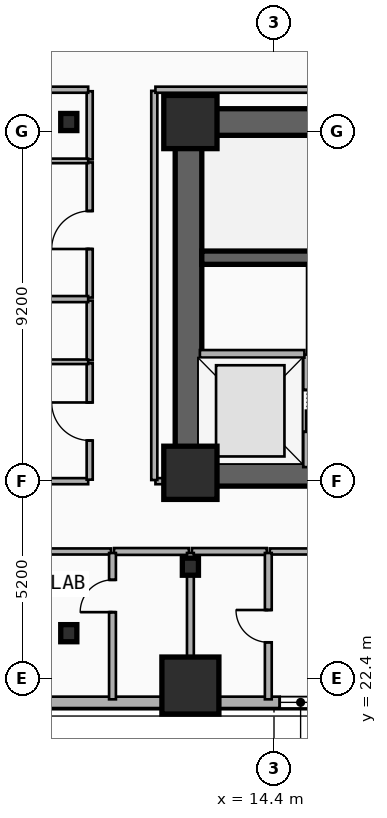
"""IFC4 building model, lengths in metres.
Left out: names, types, materials, properties, quantities, classifications, styles, units other than length and angle.
Written with IfcOpenShell. Run it as: python <this file> out.ifc"""

import sys

from ifc_helpers import new_model, si_unit, direction, frame, frame_2d, origin, origin_2d, place, context, subcontext, project, spatial, rectangle, i_section, extrude, element, fill, save


model = new_model("IFC4")
c1 = context("Model", 3, precision=1e-05, world=origin(), true_north=direction((0.0, 1.0)))
c2 = subcontext(c1, "Body", "Model", "MODEL_VIEW")
j1 = project(units=[si_unit("LENGTHUNIT", "METRE"), si_unit("PLANEANGLEUNIT", "RADIAN")], contexts=[c1])
p1 = place(None, origin())
s1 = spatial("IfcSite", under=j1, at=p1, CompositionType="ELEMENT")
p2 = place(p1, origin())
s2 = spatial("IfcBuilding", under=s1, at=p2, CompositionType="ELEMENT")
p3 = place(p2, frame((0.0, 0.0, 43.0)))
s3 = spatial("IfcBuildingStorey", under=s2, at=p3, CompositionType="ELEMENT", Elevation=43.0)
p4 = place(p3, frame((12.15, 37.05, 0.0), z_axis=(0.0, 0.0, 1.0), x_axis=(1.0, 0.0, 0.0)))
e1 = element("IfcWall", 1, at=p4, inside=s3, PredefinedType="SHEAR", context=c2, shape_type="SweptSolid", body=[
    extrude(rectangle(XDim=33.23, YDim=0.7, at=frame_2d((16.615, 0.0))), origin(), (0.0, 0.0, 1.0), 3.5),
])
p5 = place(p3, frame((21.18, 27.82, 0.0), z_axis=(0.0, 0.0, 1.0), x_axis=(-1.0, 0.0, 0.0)))
e2 = element("IfcWall", 2, at=p5, inside=s3, PredefinedType="SHEAR", context=c2, shape_type="SweptSolid", body=[
    extrude(rectangle(XDim=9.03, YDim=0.7, at=frame_2d((4.515, 0.0))), origin(), (0.0, 0.0, 1.0), 3.5),
])
p6 = place(p5, frame((2.68, 0.0, 0.0)))
e3 = element("IfcOpeningElement", 3, at=p6, cuts=e2, PredefinedType="OPENING", context=c2, shape_type="SweptSolid", body=[
    extrude(rectangle(XDim=1.1, YDim=2.15, at=frame_2d((0.55, 1.075))), frame((0.0, 0.36, 0.0), z_axis=(0.0, -1.0, 0.0), x_axis=(1.0, 0.0, 0.0)), (0.0, 0.0, 1.0), 0.72),
])
p7 = place(p3, frame((12.15, 28.17, 0.0), z_axis=(0.0, 0.0, 1.0), x_axis=(0.0, 1.0, 0.0)))
e4 = element("IfcWall", 4, at=p7, inside=s3, PredefinedType="SHEAR", context=c2, shape_type="SweptSolid", body=[
    extrude(rectangle(XDim=8.53, YDim=0.7, at=frame_2d((4.265, 0.0))), origin(), (0.0, 0.0, 1.0), 3.5),
])
p8 = place(p3, frame((21.005, 33.48, 0.0), z_axis=(0.0, 0.0, 1.0), x_axis=(-1.0, 0.0, 0.0)))
e5 = element("IfcWall", 5, at=p8, inside=s3, PredefinedType="SHEAR", context=c2, shape_type="SweptSolid", body=[
    extrude(rectangle(XDim=8.505, YDim=0.35, at=frame_2d((4.252, 0.0))), origin(), (0.0, 0.0, 1.0), 3.5),
])
p9 = place(p8, frame((0.22, 0.0, 0.0)))
e6 = element("IfcOpeningElement", 6, at=p9, cuts=e5, PredefinedType="OPENING", context=c2, shape_type="SweptSolid", body=[
    extrude(rectangle(XDim=1.1, YDim=2.15, at=frame_2d((0.55, 1.075))), frame((0.0, 0.185, 0.0), z_axis=(0.0, -1.0, 0.0), x_axis=(1.0, 0.0, 0.0)), (0.0, 0.0, 1.0), 0.37),
])
for number, where, z_axis, x_axis in (
    (7, (12.2, 27.82, 0.0), (0.0, 0.0, 1.0), (1.0, 0.0, 0.0)),
    (8, (12.2, 37.05, 0.0), (0.0, 0.0, 1.0), (1.0, 0.0, 0.0)),
):
    element("IfcColumn", number, at=place(p3, frame(where, z_axis=z_axis, x_axis=x_axis)), inside=s3, PredefinedType="COLUMN", context=c2, shape_type="SweptSolid", body=[
        extrude(rectangle(XDim=1.4, YDim=1.4, at=origin_2d()), origin(), (0.0, 0.0, 1.0), 3.5),
    ])
p10 = place(p3, frame((12.2, 25.35, 0.0), z_axis=(0.0, 0.0, 1.0), x_axis=(1.0, 0.0, 0.0)))
e9 = element("IfcColumn", 9, at=p10, inside=s3, PredefinedType="COLUMN", context=c2, shape_type="SweptSolid", body=[
    extrude(i_section(OverallWidth=0.424, OverallDepth=0.45, WebThickness=0.041, FlangeThickness=0.065, FilletRadius=0.015, at=origin_2d()), origin(), (0.0, 0.0, 1.0), 3.5),
])
p11 = place(p3, frame((12.2, 22.331, 0.0), z_axis=(0.0, -0.090241349316, 0.995919925935), x_axis=(1.0, 0.0, 0.0)))
e10 = element("IfcColumn", 10, at=p11, inside=s3, PredefinedType="COLUMN", context=c2, shape_type="SweptSolid", body=[
    extrude(rectangle(XDim=1.5, YDim=1.5, at=origin_2d()), origin(), (0.0, 0.0, 1.0), 3.514),
])
for number, where, z_axis, x_axis in (
    (11, (9.0, 23.6, 0.0), (0.0, 0.0, 1.0), (1.0, 0.0, 0.0)),
    (12, (9.0, 37.05, 0.0), (0.0, 0.0, 1.0), (1.0, 0.0, 0.0)),
):
    element("IfcColumn", number, at=place(p3, frame(where, z_axis=z_axis, x_axis=x_axis)), inside=s3, PredefinedType="COLUMN", context=c2, shape_type="SweptSolid", body=[
        extrude(i_section(OverallWidth=0.424, OverallDepth=0.45, WebThickness=0.041, FlangeThickness=0.065, FilletRadius=0.015, at=origin_2d()), origin(), (0.0, 0.0, 1.0), 3.5),
    ])
p12 = place(p3, frame((53.4, 21.78, 0.0), z_axis=(0.0, 0.0, 1.0), x_axis=(-1.0, 0.0, 0.0)))
e13 = element("IfcWall", 13, at=p12, inside=s3, PredefinedType="SOLIDWALL", context=c2, shape_type="SweptSolid", body=[
    extrude(rectangle(XDim=49.2, YDim=0.3, at=frame_2d((24.6, 0.0))), origin(), (0.0, 0.0, 1.0), 2.82),
])
p13 = place(p12, frame((46.859, 0.0, 0.65)))
e14 = element("IfcOpeningElement", 14, at=p13, cuts=e13, PredefinedType="OPENING", context=c2, shape_type="SweptSolid", body=[
    extrude(rectangle(XDim=1.8, YDim=1.8, at=frame_2d((0.9, 0.9))), frame((0.0, 0.16, 0.0), z_axis=(0.0, -1.0, 0.0), x_axis=(1.0, 0.0, 0.0)), (0.0, 0.0, 1.0), 0.32),
])
p14 = place(p12, frame((37.75, 0.0, 0.52)))
e15 = element("IfcOpeningElement", 15, at=p14, cuts=e13, PredefinedType="OPENING", context=c2, shape_type="SweptSolid", body=[
    extrude(rectangle(XDim=1.1, YDim=1.05, at=frame_2d((0.55, 0.525))), frame((0.0, 0.16, 0.0), z_axis=(0.0, -1.0, 0.0), x_axis=(1.0, 0.0, 0.0)), (0.0, 0.0, 1.0), 0.32),
])
p15 = place(p12, frame((14.658, 0.0, 0.34)))
e16 = element("IfcOpeningElement", 16, at=p15, cuts=e13, PredefinedType="OPENING", context=c2, shape_type="SweptSolid", body=[
    extrude(rectangle(XDim=1.2, YDim=1.5, at=frame_2d((0.6, 0.75))), frame((0.0, 0.16, 0.0), z_axis=(0.0, -1.0, 0.0), x_axis=(1.0, 0.0, 0.0)), (0.0, 0.0, 1.0), 0.32),
])
p16 = place(p12, frame((4.223, 0.0, 0.65)))
e17 = element("IfcOpeningElement", 17, at=p16, cuts=e13, PredefinedType="OPENING", context=c2, shape_type="SweptSolid", body=[
    extrude(rectangle(XDim=1.8, YDim=1.8, at=frame_2d((0.9, 0.9))), frame((0.0, 0.16, 0.0), z_axis=(0.0, -1.0, 0.0), x_axis=(1.0, 0.0, 0.0)), (0.0, 0.0, 1.0), 0.32),
])
p17 = place(p3, frame((15.27, 27.97, 0.0), z_axis=(0.0, 0.0, 1.0), x_axis=(0.0, 1.0, 0.0)))
e18 = element("IfcWall", 18, at=p17, inside=s3, PredefinedType="PARTITIONING", context=c2, shape_type="SweptSolid", body=[
    extrude(rectangle(XDim=2.96, YDim=0.2, at=frame_2d((1.48, 0.0))), origin(), (0.0, 0.0, 1.0), 2.212),
])
p18 = place(p17, frame((0.93, 0.0, 0.0)))
e19 = element("IfcOpeningElement", 19, at=p18, cuts=e18, PredefinedType="OPENING", context=c2, shape_type="SweptSolid", body=[
    extrude(rectangle(XDim=1.1, YDim=2.15, at=frame_2d((0.55, 1.075))), frame((0.0, 0.11, 0.0), z_axis=(0.0, -1.0, 0.0), x_axis=(1.0, 0.0, 0.0)), (0.0, 0.0, 1.0), 0.22),
])
p19 = place(p3, frame((12.45, 30.95, 0.0), z_axis=(0.0, 0.0, 1.0), x_axis=(1.0, 0.0, 0.0)))
e20 = element("IfcWall", 20, at=p19, inside=s3, PredefinedType="PARTITIONING", context=c2, shape_type="SweptSolid", body=[
    extrude(rectangle(XDim=2.75, YDim=0.2, at=frame_2d((1.375, 0.0))), origin(), (0.0, 0.0, 1.0), 2.212),
])
p20 = place(p3, frame((0.26, 27.6, 0.0), z_axis=(0.0, 0.0, 1.0), x_axis=(1.0, 0.0, 0.0)))
e21 = element("IfcWall", 21, at=p20, inside=s3, PredefinedType="PARTITIONING", context=c2, shape_type="SweptSolid", body=[
    extrude(rectangle(XDim=9.25, YDim=0.16, at=frame_2d((4.625, 0.0))), origin(), (0.0, 0.0, 1.0), 2.57),
])
p21 = place(p20, frame((4.125, 0.0, 0.0)))
e22 = element("IfcOpeningElement", 22, at=p21, cuts=e21, PredefinedType="OPENING", context=c2, shape_type="SweptSolid", body=[
    extrude(rectangle(XDim=1.0, YDim=2.15, at=frame_2d((0.5, 1.075))), frame((0.0, 0.09, 0.0), z_axis=(0.0, -1.0, 0.0), x_axis=(1.0, 0.0, 0.0)), (0.0, 0.0, 1.0), 0.18),
])
p22 = place(p3, frame((0.26, 25.75, 0.0), z_axis=(0.0, 0.0, 1.0), x_axis=(1.0, 0.0, 0.0)))
e23 = element("IfcWall", 23, at=p22, inside=s3, PredefinedType="PARTITIONING", context=c2, shape_type="SweptSolid", body=[
    extrude(rectangle(XDim=9.85, YDim=0.16, at=frame_2d((4.925, 0.0))), origin(), (0.0, 0.0, 1.0), 2.57),
])
p23 = place(p22, frame((4.425, 0.0, 0.0)))
e24 = element("IfcOpeningElement", 24, at=p23, cuts=e23, PredefinedType="OPENING", context=c2, shape_type="SweptSolid", body=[
    extrude(rectangle(XDim=1.0, YDim=2.15, at=frame_2d((0.5, 1.075))), frame((0.0, 0.09, 0.0), z_axis=(0.0, -1.0, 0.0), x_axis=(1.0, 0.0, 0.0)), (0.0, 0.0, 1.0), 0.18),
])
p24 = place(p3, frame((10.19, 25.75, 0.0), z_axis=(0.0, 0.0, 1.0), x_axis=(1.0, 0.0, 0.0)))
e25 = element("IfcWall", 25, at=p24, inside=s3, PredefinedType="PLUMBINGWALL", context=c2, shape_type="SweptSolid", body=[
    extrude(rectangle(XDim=1.97, YDim=0.18, at=frame_2d((0.985, 0.0))), origin(), (0.0, 0.0, 1.0), 2.28),
])
p25 = place(p3, frame((14.29, 25.75, 0.0), z_axis=(0.0, 0.0, 1.0), x_axis=(1.0, 0.0, 0.0)))
e26 = element("IfcWall", 26, at=p25, inside=s3, PredefinedType="PARTITIONING", context=c2, shape_type="SweptSolid", body=[
    extrude(rectangle(XDim=8.47, YDim=0.16, at=frame_2d((4.235, 0.0))), origin(), (0.0, 0.0, 1.0), 2.28),
])
p26 = place(p25, frame((3.735, 0.0, 0.0)))
e27 = element("IfcOpeningElement", 27, at=p26, cuts=e26, PredefinedType="OPENING", context=c2, shape_type="SweptSolid", body=[
    extrude(rectangle(XDim=1.0, YDim=2.15, at=frame_2d((0.5, 1.075))), frame((0.0, 0.09, 0.0), z_axis=(0.0, -1.0, 0.0), x_axis=(1.0, 0.0, 0.0)), (0.0, 0.0, 1.0), 0.18),
])
p27 = place(p3, frame((12.24, 25.75, 0.0), z_axis=(0.0, 0.0, 1.0), x_axis=(1.0, 0.0, 0.0)))
e28 = element("IfcWall", 28, at=p27, inside=s3, PredefinedType="PLUMBINGWALL", context=c2, shape_type="SweptSolid", body=[
    extrude(rectangle(XDim=1.97, YDim=0.18, at=frame_2d((0.985, 0.0))), origin(), (0.0, 0.0, 1.0), 2.28),
])
p28 = place(p3, frame((9.55, 27.64, 0.0), z_axis=(0.0, 0.0, 1.0), x_axis=(0.0, 1.0, 0.0)))
e29 = element("IfcWall", 29, at=p28, inside=s3, PredefinedType="PARTITIONING", context=c2, shape_type="SweptSolid", body=[
    extrude(rectangle(XDim=3.061, YDim=0.16, at=frame_2d((1.531, 0.0))), origin(), (0.0, 0.0, 1.0), 3.24),
])
p29 = place(p28, frame((1.031, 0.0, 0.0)))
e30 = element("IfcOpeningElement", 30, at=p29, cuts=e29, PredefinedType="OPENING", context=c2, shape_type="SweptSolid", body=[
    extrude(rectangle(XDim=1.0, YDim=2.15, at=frame_2d((0.5, 1.075))), frame((0.0, 0.09, 0.0), z_axis=(0.0, -1.0, 0.0), x_axis=(1.0, 0.0, 0.0)), (0.0, 0.0, 1.0), 0.18),
])
p30 = place(p3, frame((9.55, 30.781, 0.0), z_axis=(0.0, 0.0, 1.0), x_axis=(0.0, 1.0, 0.0)))
e31 = element("IfcWall", 31, at=p30, inside=s3, PredefinedType="PARTITIONING", context=c2, shape_type="SweptSolid", body=[
    extrude(rectangle(XDim=1.57, YDim=0.16, at=frame_2d((0.785, 0.0))), origin(), (0.0, 0.0, 1.0), 3.24),
])
p31 = place(p3, frame((9.55, 32.431, 0.0), z_axis=(0.0, 0.0, 1.0), x_axis=(0.0, 1.0, 0.0)))
e32 = element("IfcWall", 32, at=p31, inside=s3, PredefinedType="PARTITIONING", context=c2, shape_type="SweptSolid", body=[
    extrude(rectangle(XDim=3.556, YDim=0.16, at=frame_2d((1.778, 0.0))), origin(), (0.0, 0.0, 1.0), 3.24),
])
p32 = place(p31, frame((1.278, 0.0, 0.0)))
e33 = element("IfcOpeningElement", 33, at=p32, cuts=e32, PredefinedType="OPENING", context=c2, shape_type="SweptSolid", body=[
    extrude(rectangle(XDim=1.0, YDim=2.15, at=frame_2d((0.5, 1.075))), frame((0.0, 0.09, 0.0), z_axis=(0.0, -1.0, 0.0), x_axis=(1.0, 0.0, 0.0)), (0.0, 0.0, 1.0), 0.18),
])
p33 = place(p3, frame((9.55, 36.067, 0.0), z_axis=(0.0, 0.0, 1.0), x_axis=(0.0, 1.0, 0.0)))
e34 = element("IfcWall", 34, at=p33, inside=s3, PredefinedType="PARTITIONING", context=c2, shape_type="SweptSolid", body=[
    extrude(rectangle(XDim=1.793, YDim=0.16, at=frame_2d((0.896, 0.0))), origin(), (0.0, 0.0, 1.0), 2.72),
])
p34 = place(p3, frame((2.8, 37.9, 0.0), z_axis=(0.0, 0.0, 1.0), x_axis=(1.0, 0.0, 0.0)))
e35 = element("IfcWall", 35, at=p34, inside=s3, PredefinedType="PARTITIONING", context=c2, shape_type="SweptSolid", body=[
    extrude(rectangle(XDim=6.71, YDim=0.16, at=frame_2d((3.355, 0.0))), origin(), (0.0, 0.0, 1.0), 3.24),
])
p35 = place(p3, frame((2.8, 30.741, 0.0), z_axis=(0.0, 0.0, 1.0), x_axis=(1.0, 0.0, 0.0)))
e36 = element("IfcWall", 36, at=p35, inside=s3, PredefinedType="PARTITIONING", context=c2, shape_type="SweptSolid", body=[
    extrude(rectangle(XDim=6.71, YDim=0.12, at=frame_2d((3.355, 0.0))), origin(), (0.0, 0.0, 1.0), 2.57),
])
p36 = place(p35, frame((2.905, 0.0, 0.0)))
e37 = element("IfcOpeningElement", 37, at=p36, cuts=e36, PredefinedType="OPENING", context=c2, shape_type="SweptSolid", body=[
    extrude(rectangle(XDim=0.9, YDim=2.1, at=frame_2d((0.45, 1.05))), frame((0.0, 0.07, 0.0), z_axis=(0.0, -1.0, 0.0), x_axis=(1.0, 0.0, 0.0)), (0.0, 0.0, 1.0), 0.14),
])
p37 = place(p3, frame((2.8, 32.391, 0.0), z_axis=(0.0, 0.0, 1.0), x_axis=(1.0, 0.0, 0.0)))
e38 = element("IfcWall", 38, at=p37, inside=s3, PredefinedType="PARTITIONING", context=c2, shape_type="SweptSolid", body=[
    extrude(rectangle(XDim=6.71, YDim=0.16, at=frame_2d((3.355, 0.0))), origin(), (0.0, 0.0, 1.0), 2.57),
])
p38 = place(p3, frame((2.8, 36.027, 0.0), z_axis=(0.0, 0.0, 1.0), x_axis=(1.0, 0.0, 0.0)))
e39 = element("IfcWall", 39, at=p38, inside=s3, PredefinedType="PARTITIONING", context=c2, shape_type="SweptSolid", body=[
    extrude(rectangle(XDim=6.71, YDim=0.12, at=frame_2d((3.355, 0.0))), origin(), (0.0, 0.0, 1.0), 2.57),
])
p39 = place(p38, frame((2.905, 0.0, 0.0)))
e40 = element("IfcOpeningElement", 40, at=p39, cuts=e39, PredefinedType="OPENING", context=c2, shape_type="SweptSolid", body=[
    extrude(rectangle(XDim=0.9, YDim=2.1, at=frame_2d((0.45, 1.05))), frame((0.0, 0.07, 0.0), z_axis=(0.0, -1.0, 0.0), x_axis=(1.0, 0.0, 0.0)), (0.0, 0.0, 1.0), 0.14),
])
p40 = place(p3, frame((10.15, 21.86, 0.0), z_axis=(0.0, 0.0, 1.0), x_axis=(0.0, 1.0, 0.0)))
e41 = element("IfcWall", 41, at=p40, inside=s3, PredefinedType="PLUMBINGWALL", context=c2, shape_type="SweptSolid", body=[
    extrude(rectangle(XDim=3.85, YDim=0.18, at=frame_2d((1.925, 0.0))), origin(), (0.0, 0.0, 1.0), 2.72),
])
p41 = place(p40, frame((2.293, 0.0, 0.0)))
e42 = element("IfcOpeningElement", 42, at=p41, cuts=e41, PredefinedType="OPENING", context=c2, shape_type="SweptSolid", body=[
    extrude(rectangle(XDim=0.85, YDim=2.1, at=frame_2d((0.425, 1.05))), frame((0.0, 0.1, 0.0), z_axis=(0.0, -1.0, 0.0), x_axis=(1.0, 0.0, 0.0)), (0.0, 0.0, 1.0), 0.2),
])
p42 = place(p3, frame((12.2, 21.86, 0.0), z_axis=(0.0, 0.0, 1.0), x_axis=(0.0, 1.0, 0.0)))
e43 = element("IfcWall", 43, at=p42, inside=s3, PredefinedType="PLUMBINGWALL", context=c2, shape_type="SweptSolid", body=[
    extrude(rectangle(XDim=3.85, YDim=0.18, at=frame_2d((1.925, 0.0))), origin(), (0.0, 0.0, 1.0), 2.28),
])
p43 = place(p3, frame((14.25, 21.86, 0.0), z_axis=(0.0, 0.0, 1.0), x_axis=(0.0, 1.0, 0.0)))
e44 = element("IfcWall", 44, at=p43, inside=s3, PredefinedType="PLUMBINGWALL", context=c2, shape_type="SweptSolid", body=[
    extrude(rectangle(XDim=3.85, YDim=0.18, at=frame_2d((1.925, 0.0))), origin(), (0.0, 0.0, 1.0), 2.67),
])
p44 = place(p43, frame((1.5, 0.0, 0.0)))
e45 = element("IfcOpeningElement", 45, at=p44, cuts=e44, PredefinedType="OPENING", context=c2, shape_type="SweptSolid", body=[
    extrude(rectangle(XDim=0.85, YDim=2.1, at=frame_2d((0.425, 1.05))), frame((0.0, 0.1, 0.0), z_axis=(0.0, -1.0, 0.0), x_axis=(1.0, 0.0, 0.0)), (0.0, 0.0, 1.0), 0.2),
])
p45 = place(p3, frame((11.28, 27.6, 0.0), z_axis=(0.0, 0.0, 1.0), x_axis=(1.0, 0.0, 0.0)))
e46 = element("IfcWall", 46, at=p45, inside=s3, PredefinedType="PARTITIONING", context=c2, shape_type="SweptSolid", body=[
    extrude(rectangle(XDim=0.84, YDim=0.16, at=frame_2d((0.42, 0.0))), origin(), (0.0, 0.0, 1.0), 2.28),
])
p46 = place(p3, frame((11.25, 27.63, 0.0), z_axis=(0.0, 0.0, 1.0), x_axis=(0.0, 1.0, 0.0)))
e47 = element("IfcWall", 47, at=p46, inside=s3, PredefinedType="PARTITIONING", context=c2, shape_type="SweptSolid", body=[
    extrude(rectangle(XDim=10.24, YDim=0.16, at=frame_2d((5.12, 0.0))), origin(), (0.0, 0.0, 1.0), 2.72),
])
p47 = place(p3, frame((11.28, 37.9, 0.0), z_axis=(0.0, 0.0, 1.0), x_axis=(1.0, 0.0, 0.0)))
e48 = element("IfcWall", 48, at=p47, inside=s3, PredefinedType="PARTITIONING", context=c2, shape_type="SweptSolid", body=[
    extrude(rectangle(XDim=35.04, YDim=0.16, at=frame_2d((17.52, 0.0))), origin(), (0.0, 0.0, 1.0), 3.24),
])
p48 = place(p14, origin())
e49 = element("IfcWindow", 49, at=p48, inside=s3, PartitioningType="SINGLE_PANEL", PredefinedType="WINDOW", context=c2, shape_type="SweptSolid", body=[
    extrude(rectangle(XDim=1.1, YDim=1.05, at=frame_2d((0.55, 0.525))), frame((0.0, 0.03, 0.0), z_axis=(0.0, -1.0, 0.0), x_axis=(1.0, 0.0, 0.0)), (0.0, 0.0, 1.0), 0.06),
])
fill(e15, e49)
p49 = place(p18, origin())
e50 = element("IfcDoor", 50, at=p49, inside=s3, OperationType="DOUBLE_DOOR_SLIDING", PredefinedType="DOOR", context=c2, shape_type="SweptSolid", body=[
    extrude(rectangle(XDim=1.1, YDim=2.15, at=frame_2d((0.55, 1.075))), frame((0.0, 0.025, 0.0), z_axis=(0.0, -1.0, 0.0), x_axis=(1.0, 0.0, 0.0)), (0.0, 0.0, 1.0), 0.05),
])
fill(e19, e50)
p50 = place(p29, origin())
e51 = element("IfcDoor", 51, at=p50, inside=s3, OperationType="SINGLE_SWING_RIGHT", PredefinedType="DOOR", context=c2, shape_type="SweptSolid", body=[
    extrude(rectangle(XDim=1.0, YDim=2.15, at=frame_2d((0.5, 1.075))), frame((0.0, 0.025, 0.0), z_axis=(0.0, -1.0, 0.0), x_axis=(1.0, 0.0, 0.0)), (0.0, 0.0, 1.0), 0.05),
])
fill(e30, e51)
p51 = place(p32, origin())
e52 = element("IfcDoor", 52, at=p51, inside=s3, OperationType="SINGLE_SWING_LEFT", PredefinedType="DOOR", context=c2, shape_type="SweptSolid", body=[
    extrude(rectangle(XDim=1.0, YDim=2.15, at=frame_2d((0.5, 1.075))), frame((0.0, 0.025, 0.0), z_axis=(0.0, -1.0, 0.0), x_axis=(1.0, 0.0, 0.0)), (0.0, 0.0, 1.0), 0.05),
])
fill(e33, e52)
p52 = place(p41, origin())
e53 = element("IfcDoor", 53, at=p52, inside=s3, OperationType="SINGLE_SWING_LEFT", PredefinedType="DOOR", context=c2, shape_type="SweptSolid", body=[
    extrude(rectangle(XDim=0.85, YDim=2.1, at=frame_2d((0.425, 1.05))), frame((0.0, 0.025, 0.0), z_axis=(0.0, -1.0, 0.0), x_axis=(1.0, 0.0, 0.0)), (0.0, 0.0, 1.0), 0.05),
])
fill(e42, e53)
p53 = place(p44, origin())
e54 = element("IfcDoor", 54, at=p53, inside=s3, OperationType="SINGLE_SWING_RIGHT", PredefinedType="DOOR", context=c2, shape_type="SweptSolid", body=[
    extrude(rectangle(XDim=0.85, YDim=2.1, at=frame_2d((0.425, 1.05))), frame((0.0, 0.025, 0.0), z_axis=(0.0, -1.0, 0.0), x_axis=(1.0, 0.0, 0.0)), (0.0, 0.0, 1.0), 0.05),
])
fill(e45, e54)
save(model, sys.argv[1])
